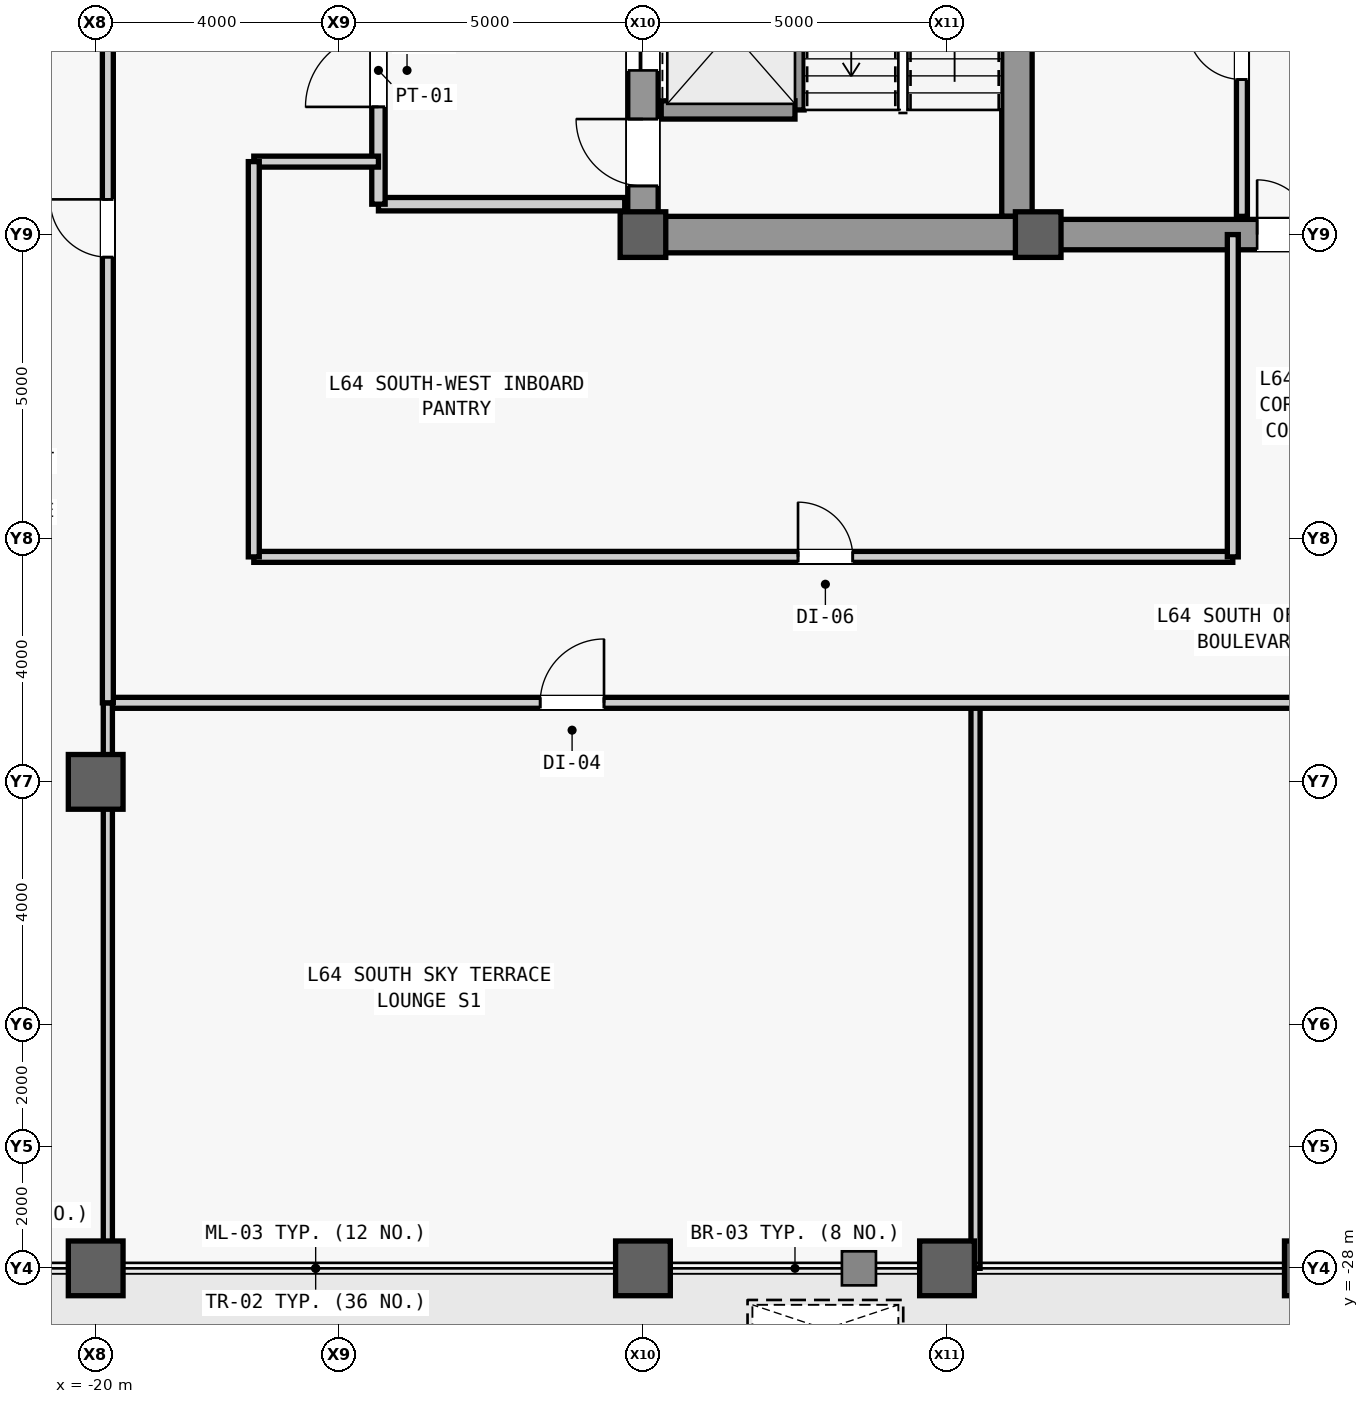
"""IFC4 building model, lengths in metres.
Left out: names, types, materials, properties, quantities, classifications, styles, units other than length and angle.
Written with IfcOpenShell. Run it as: python <this file> out.ifc"""

import sys

from ifc_helpers import new_model, si_unit, direction, frame, frame_2d, origin, origin_2d, place, context, subcontext, project, spatial, rectangle, hollow_rectangle, extrude, source, transform, mapped, element, fill, save


model = new_model("IFC4")
c1 = context("Model", 3, precision=1e-05, world=origin(), true_north=direction((0.0, 1.0)))
c2 = subcontext(c1, "Body", "Model", "MODEL_VIEW")
j1 = project(units=[si_unit("LENGTHUNIT", "METRE"), si_unit("PLANEANGLEUNIT", "RADIAN")], contexts=[c1])
p1 = place(None, origin())
s1 = spatial("IfcSite", under=j1, at=p1, CompositionType="ELEMENT")
p2 = place(p1, origin())
s2 = spatial("IfcBuilding", under=s1, at=p2, CompositionType="ELEMENT")
p3 = place(p2, frame((0.0, 0.0, 273.5)))
s3 = spatial("IfcBuildingStorey", under=s2, at=p3, CompositionType="ELEMENT", Elevation=273.5)
m1 = source(origin(), c2, "Body", "SweptSolid", [
    extrude(rectangle(XDim=22.0, YDim=0.5, at=frame_2d((11.0, 0.0))), origin(), (0.0, 0.0, 1.0), 3.78),
])
p4 = place(p3, frame((-11.0, -11.0, 0.0), z_axis=(0.0, 0.0, 1.0), x_axis=(0.0, 1.0, 0.0)))
e1 = element("IfcWall", 1, at=p4, inside=s3, PredefinedType="SHEAR", context=c2, shape_type="MappedRepresentation", body=[
    mapped(m1, transform((0.0, 0.0, 0.0), scale=1.0)),
])
m2 = source(origin(), c2, "Body", "SweptSolid", [
    extrude(rectangle(XDim=1.1, YDim=2.2, at=frame_2d((0.55, 1.1))), frame((0.0, 0.26, 0.0), z_axis=(0.0, -1.0, 0.0), x_axis=(1.0, 0.0, 0.0)), (0.0, 0.0, 1.0), 0.52),
])
p5 = place(p4, frame((0.8, 0.0, 0.0)))
e2 = element("IfcOpeningElement", 2, at=p5, cuts=e1, PredefinedType="OPENING", context=c2, shape_type="MappedRepresentation", body=[
    mapped(m2, transform((0.0, 0.0, 0.0), scale=1.0)),
])
p6 = place(p4, frame((12.5, 0.0, 0.0)))
e3 = element("IfcOpeningElement", 3, at=p6, cuts=e1, PredefinedType="OPENING", context=c2, shape_type="MappedRepresentation", body=[
    mapped(m2, transform((0.0, 0.0, 0.0), scale=1.0)),
])
m3 = source(origin(), c2, "Body", "SweptSolid", [
    extrude(rectangle(XDim=0.9, YDim=2.15, at=frame_2d((0.45, 1.075))), frame((0.0, 0.26, 0.0), z_axis=(0.0, -1.0, 0.0), x_axis=(1.0, 0.0, 0.0)), (0.0, 0.0, 1.0), 0.52),
])
p7 = place(p4, frame((6.2, 0.0, 0.0)))
e4 = element("IfcOpeningElement", 4, at=p7, cuts=e1, PredefinedType="OPENING", context=c2, shape_type="MappedRepresentation", body=[
    mapped(m3, transform((0.0, 0.0, 0.0), scale=1.0)),
])
p8 = place(p4, frame((8.05, 0.0, 0.0)))
e5 = element("IfcOpeningElement", 5, at=p8, cuts=e1, PredefinedType="OPENING", context=c2, shape_type="MappedRepresentation", body=[
    mapped(m3, transform((0.0, 0.0, 0.0), scale=1.0)),
])
m4 = source(origin(), c2, "Body", "SweptSolid", [
    extrude(rectangle(XDim=1.2, YDim=2.3, at=frame_2d((0.6, 1.15))), frame((0.0, 0.26, 0.0), z_axis=(0.0, -1.0, 0.0), x_axis=(1.0, 0.0, 0.0)), (0.0, 0.0, 1.0), 0.52),
])
p9 = place(p4, frame((14.6, 0.0, 0.0)))
e6 = element("IfcOpeningElement", 6, at=p9, cuts=e1, PredefinedType="OPENING", context=c2, shape_type="MappedRepresentation", body=[
    mapped(m4, transform((0.0, 0.0, 0.0), scale=1.0)),
])
p10 = place(p4, frame((18.2, 0.0, 0.0)))
e7 = element("IfcOpeningElement", 7, at=p10, cuts=e1, PredefinedType="OPENING", context=c2, shape_type="MappedRepresentation", body=[
    mapped(m4, transform((0.0, 0.0, 0.0), scale=1.0)),
])
m5 = source(origin(), c2, "Body", "SweptSolid", [
    extrude(rectangle(XDim=1.3, YDim=2.3, at=frame_2d((0.65, 1.15))), frame((0.0, 0.26, 0.0), z_axis=(0.0, -1.0, 0.0), x_axis=(1.0, 0.0, 0.0)), (0.0, 0.0, 1.0), 0.52),
])
p11 = place(p4, frame((2.7, 0.0, 0.0)))
e8 = element("IfcOpeningElement", 8, at=p11, cuts=e1, PredefinedType="OPENING", context=c2, shape_type="MappedRepresentation", body=[
    mapped(m5, transform((0.0, 0.0, 0.0), scale=1.0)),
])
m6 = source(origin(), c2, "Body", "SweptSolid", [
    extrude(rectangle(XDim=21.4, YDim=0.5, at=frame_2d((10.7, 0.0))), origin(), (0.0, 0.0, 1.0), 3.78),
])
p12 = place(p3, frame((-4.85, -10.7, 0.0), z_axis=(0.0, 0.0, 1.0), x_axis=(0.0, 1.0, 0.0)))
e9 = element("IfcWall", 9, at=p12, inside=s3, PredefinedType="SHEAR", context=c2, shape_type="MappedRepresentation", body=[
    mapped(m6, transform((0.0, 0.0, 0.0), scale=1.0)),
])
m7 = source(origin(), c2, "Body", "SweptSolid", [
    extrude(rectangle(XDim=5.9, YDim=0.6, at=frame_2d((2.95, 0.0))), origin(), (0.0, 0.0, 1.0), 3.78),
])
p13 = place(p3, frame((-10.75, -11.0, 0.0), z_axis=(0.0, 0.0, 1.0), x_axis=(1.0, 0.0, 0.0)))
e10 = element("IfcWall", 10, at=p13, inside=s3, PredefinedType="SHEAR", context=c2, shape_type="MappedRepresentation", body=[
    mapped(m7, transform((0.0, 0.0, 0.0), scale=1.0)),
])
m8 = source(origin(), c2, "Body", "SweptSolid", [
    extrude(rectangle(XDim=9.2, YDim=0.5, at=frame_2d((4.6, 0.0))), origin(), (0.0, 0.0, 1.0), 3.78),
])
p14 = place(p3, frame((-4.6, -11.0, 0.0), z_axis=(0.0, 0.0, 1.0), x_axis=(1.0, 0.0, 0.0)))
e11 = element("IfcWall", 11, at=p14, inside=s3, PredefinedType="SHEAR", context=c2, shape_type="MappedRepresentation", body=[
    mapped(m8, transform((0.0, 0.0, 0.0), scale=1.0)),
])
m9 = source(origin(), c2, "Body", "SweptSolid", [
    extrude(rectangle(XDim=1.8, YDim=2.25, at=frame_2d((0.9, 1.125))), frame((0.0, 0.26, 0.0), z_axis=(0.0, -1.0, 0.0), x_axis=(1.0, 0.0, 0.0)), (0.0, 0.0, 1.0), 0.52),
])
p15 = place(p14, frame((3.7, 0.0, 0.0)))
e12 = element("IfcOpeningElement", 12, at=p15, cuts=e11, PredefinedType="OPENING", context=c2, shape_type="MappedRepresentation", body=[
    mapped(m9, transform((0.0, 0.0, 0.0), scale=1.0)),
])
m10 = source(origin(), c2, "Body", "SweptSolid", [
    extrude(hollow_rectangle(XDim=0.9, YDim=0.9, WallThickness=0.05, at=origin_2d()), origin(), (0.0, 0.0, 1.0), 4.0),
])
for number, where, z_axis, x_axis in (
    (13, (-20.0, -28.0, 0.0), (0.0, 0.0, 1.0), (1.0, 0.0, 0.0)),
    (14, (-20.0, -20.0, 0.0), (0.0, 0.0, 1.0), (1.0, 0.0, 0.0)),
    (15, (-11.0, -28.0, 0.0), (0.0, 0.0, 1.0), (1.0, 0.0, 0.0)),
):
    element("IfcColumn", number, at=place(p3, frame(where, z_axis=z_axis, x_axis=x_axis)), inside=s3, PredefinedType="COLUMN", context=c2, shape_type="MappedRepresentation", body=[
        mapped(m10, transform((0.0, 0.0, 0.0), scale=1.0)),
    ])
m11 = source(origin(), c2, "Body", "SweptSolid", [
    extrude(rectangle(XDim=0.75, YDim=0.75, at=origin_2d()), origin(), (0.0, 0.0, 1.0), 4.0),
])
p16 = place(p3, frame((-11.0, -11.0, 0.0), z_axis=(0.0, 0.0, 1.0), x_axis=(1.0, 0.0, 0.0)))
e16 = element("IfcColumn", 16, at=p16, inside=s3, PredefinedType="COLUMN", context=c2, shape_type="MappedRepresentation", body=[
    mapped(m11, transform((0.0, 0.0, 0.0), scale=1.0)),
])
p17 = place(p3, frame((-6.0, -28.0, 0.0), z_axis=(0.0, 0.0, 1.0), x_axis=(1.0, 0.0, 0.0)))
e17 = element("IfcColumn", 17, at=p17, inside=s3, PredefinedType="COLUMN", context=c2, shape_type="MappedRepresentation", body=[
    mapped(m10, transform((0.0, 0.0, 0.0), scale=1.0)),
])
p18 = place(p3, frame((-4.5, -11.0, 0.0), z_axis=(0.0, 0.0, 1.0), x_axis=(1.0, 0.0, 0.0)))
e18 = element("IfcColumn", 18, at=p18, inside=s3, PredefinedType="COLUMN", context=c2, shape_type="MappedRepresentation", body=[
    mapped(m11, transform((0.0, 0.0, 0.0), scale=1.0)),
])
p19 = place(p3, frame((0.0, -28.0, 0.0), z_axis=(0.0, 0.0, 1.0), x_axis=(1.0, 0.0, 0.0)))
e19 = element("IfcColumn", 19, at=p19, inside=s3, PredefinedType="COLUMN", context=c2, shape_type="MappedRepresentation", body=[
    mapped(m10, transform((0.0, 0.0, 0.0), scale=1.0)),
])
m12 = source(origin(), c2, "Body", "SweptSolid", [
    extrude(rectangle(XDim=7.8, YDim=0.3, at=frame_2d((3.9, 0.0))), origin(), (0.0, 0.0, 1.0), 3.78),
])
p20 = place(p3, frame((-8.5, -8.95, 0.0), z_axis=(0.0, 0.0, 1.0), x_axis=(0.0, 1.0, 0.0)))
e20 = element("IfcWall", 20, at=p20, inside=s3, PredefinedType="SHEAR", context=c2, shape_type="MappedRepresentation", body=[
    mapped(m12, transform((0.0, 0.0, 0.0), scale=1.0)),
])
m13 = source(origin(), c2, "Body", "SweptSolid", [
    extrude(rectangle(XDim=2.2, YDim=0.3, at=frame_2d((1.1, 0.0))), origin(), (0.0, 0.0, 1.0), 3.78),
])
p21 = place(p3, frame((-10.7, -8.95, 0.0), z_axis=(0.0, 0.0, 1.0), x_axis=(1.0, 0.0, 0.0)))
e21 = element("IfcWall", 21, at=p21, inside=s3, PredefinedType="SHEAR", context=c2, shape_type="MappedRepresentation", body=[
    mapped(m13, transform((0.0, 0.0, 0.0), scale=1.0)),
])
m14 = source(origin(), c2, "Body", "SweptSolid", [
    extrude(rectangle(XDim=4.05, YDim=0.22, at=frame_2d((2.025, 0.0))), origin(), (0.0, 0.0, 1.0), 3.78),
])
p22 = place(p3, frame((-15.35, -10.5, 0.0), z_axis=(0.0, 0.0, 1.0), x_axis=(1.0, 0.0, 0.0)))
e22 = element("IfcWall", 22, at=p22, inside=s3, PredefinedType="PARTITIONING", context=c2, shape_type="MappedRepresentation", body=[
    mapped(m14, transform((0.0, 0.0, 0.0), scale=1.0)),
])
m15 = source(origin(), c2, "Body", "SweptSolid", [
    extrude(rectangle(XDim=4.4, YDim=0.22, at=frame_2d((2.2, 0.0))), origin(), (0.0, 0.0, 1.0), 3.78),
])
p23 = place(p3, frame((-15.35, -10.5, 0.0), z_axis=(0.0, 0.0, 1.0), x_axis=(0.0, 1.0, 0.0)))
e23 = element("IfcWall", 23, at=p23, inside=s3, PredefinedType="PARTITIONING", context=c2, shape_type="MappedRepresentation", body=[
    mapped(m15, transform((0.0, 0.0, 0.0), scale=1.0)),
])
m16 = source(origin(), c2, "Body", "SweptSolid", [
    extrude(rectangle(XDim=1.2, YDim=2.2, at=frame_2d((0.6, 1.1))), frame((0.0, 0.12, 0.0), z_axis=(0.0, -1.0, 0.0), x_axis=(1.0, 0.0, 0.0)), (0.0, 0.0, 1.0), 0.24),
])
p24 = place(p23, frame((1.6, 0.0, 0.0)))
e24 = element("IfcOpeningElement", 24, at=p24, cuts=e23, PredefinedType="OPENING", context=c2, shape_type="MappedRepresentation", body=[
    mapped(m16, transform((0.0, 0.0, 0.0), scale=1.0)),
])
m17 = source(origin(), c2, "Body", "SweptSolid", [
    extrude(rectangle(XDim=5.4, YDim=0.18, at=frame_2d((2.7, 0.0))), origin(), (0.0, 0.0, 1.0), 3.78),
])
p25 = place(p3, frame((-1.15, -10.7, 0.0), z_axis=(0.0, 0.0, 1.0), x_axis=(0.0, 1.0, 0.0)))
e25 = element("IfcWall", 25, at=p25, inside=s3, PredefinedType="PARTITIONING", context=c2, shape_type="MappedRepresentation", body=[
    mapped(m17, transform((0.0, 0.0, 0.0), scale=1.0)),
])
m18 = source(origin(), c2, "Body", "SweptSolid", [
    extrude(rectangle(XDim=0.9, YDim=2.15, at=frame_2d((0.45, 1.075))), frame((0.0, 0.1, 0.0), z_axis=(0.0, -1.0, 0.0), x_axis=(1.0, 0.0, 0.0)), (0.0, 0.0, 1.0), 0.2),
])
p26 = place(p25, frame((2.25, 0.0, 0.0)))
e26 = element("IfcOpeningElement", 26, at=p26, cuts=e25, PredefinedType="OPENING", context=c2, shape_type="MappedRepresentation", body=[
    mapped(m18, transform((0.0, 0.0, 0.0), scale=1.0)),
])
m19 = source(origin(), c2, "Body", "SweptSolid", [
    extrude(rectangle(XDim=2.05, YDim=0.18, at=frame_2d((1.025, 0.0))), origin(), (0.0, 0.0, 1.0), 3.78),
])
p27 = place(p3, frame((-17.4, -9.8, 0.0), z_axis=(0.0, 0.0, 1.0), x_axis=(1.0, 0.0, 0.0)))
e27 = element("IfcWall", 27, at=p27, inside=s3, PredefinedType="PARTITIONING", context=c2, shape_type="MappedRepresentation", body=[
    mapped(m19, transform((0.0, 0.0, 0.0), scale=1.0)),
])
m20 = source(origin(), c2, "Body", "SweptSolid", [
    extrude(rectangle(XDim=16.1, YDim=0.18, at=frame_2d((8.05, 0.0))), origin(), (0.0, 0.0, 1.0), 3.78),
])
p28 = place(p3, frame((-17.4, -16.3, 0.0), z_axis=(0.0, 0.0, 1.0), x_axis=(1.0, 0.0, 0.0)))
e28 = element("IfcWall", 28, at=p28, inside=s3, PredefinedType="PARTITIONING", context=c2, shape_type="MappedRepresentation", body=[
    mapped(m20, transform((0.0, 0.0, 0.0), scale=1.0)),
])
p29 = place(p28, frame((8.95, 0.0, 0.0)))
e29 = element("IfcOpeningElement", 29, at=p29, cuts=e28, PredefinedType="OPENING", context=c2, shape_type="MappedRepresentation", body=[
    mapped(m18, transform((0.0, 0.0, 0.0), scale=1.0)),
])
m21 = source(origin(), c2, "Body", "SweptSolid", [
    extrude(rectangle(XDim=6.5, YDim=0.18, at=frame_2d((3.25, 0.0))), origin(), (0.0, 0.0, 1.0), 3.78),
])
p30 = place(p3, frame((-17.4, -16.3, 0.0), z_axis=(0.0, 0.0, 1.0), x_axis=(0.0, 1.0, 0.0)))
e30 = element("IfcWall", 30, at=p30, inside=s3, PredefinedType="PARTITIONING", context=c2, shape_type="MappedRepresentation", body=[
    mapped(m21, transform((0.0, 0.0, 0.0), scale=1.0)),
])
m22 = source(origin(), c2, "Body", "SweptSolid", [
    extrude(rectangle(XDim=5.3, YDim=0.18, at=frame_2d((2.65, 0.0))), origin(), (0.0, 0.0, 1.0), 3.78),
])
p31 = place(p3, frame((-1.3, -16.3, 0.0), z_axis=(0.0, 0.0, 1.0), x_axis=(0.0, 1.0, 0.0)))
e31 = element("IfcWall", 31, at=p31, inside=s3, PredefinedType="PARTITIONING", context=c2, shape_type="MappedRepresentation", body=[
    mapped(m22, transform((0.0, 0.0, 0.0), scale=1.0)),
])
m23 = source(origin(), c2, "Body", "SweptSolid", [
    extrude(rectangle(XDim=9.3, YDim=0.15, at=frame_2d((4.65, 0.0))), origin(), (0.0, 0.0, 1.0), 3.78),
])
p32 = place(p3, frame((-5.531, -28.0, 0.0), z_axis=(0.0, 0.0, 1.0), x_axis=(0.0, 1.0, 0.0)))
e32 = element("IfcWall", 32, at=p32, inside=s3, PredefinedType="PARTITIONING", context=c2, shape_type="MappedRepresentation", body=[
    mapped(m23, transform((0.0, 0.0, 0.0), scale=1.0)),
])
m24 = source(origin(), c2, "Body", "SweptSolid", [
    extrude(rectangle(XDim=37.55, YDim=0.18, at=frame_2d((18.775, 0.0))), origin(), (0.0, 0.0, 1.0), 3.78),
])
p33 = place(p3, frame((-19.8, -18.7, 0.0), z_axis=(0.0, 0.0, 1.0), x_axis=(1.0, 0.0, 0.0)))
e33 = element("IfcWall", 33, at=p33, inside=s3, PredefinedType="PARTITIONING", context=c2, shape_type="MappedRepresentation", body=[
    mapped(m24, transform((0.0, 0.0, 0.0), scale=1.0)),
])
m25 = source(origin(), c2, "Body", "SweptSolid", [
    extrude(rectangle(XDim=1.05, YDim=2.2, at=frame_2d((0.525, 1.1))), frame((0.0, 0.1, 0.0), z_axis=(0.0, -1.0, 0.0), x_axis=(1.0, 0.0, 0.0)), (0.0, 0.0, 1.0), 0.2),
])
p34 = place(p33, frame((7.11, 0.0, 0.0)))
e34 = element("IfcOpeningElement", 34, at=p34, cuts=e33, PredefinedType="OPENING", context=c2, shape_type="MappedRepresentation", body=[
    mapped(m25, transform((0.0, 0.0, 0.0), scale=1.0)),
])
p35 = place(p33, frame((24.86, 0.0, 0.0)))
e35 = element("IfcOpeningElement", 35, at=p35, cuts=e33, PredefinedType="OPENING", context=c2, shape_type="MappedRepresentation", body=[
    mapped(m25, transform((0.0, 0.0, 0.0), scale=1.0)),
])
m26 = source(origin(), c2, "Body", "SweptSolid", [
    extrude(rectangle(XDim=9.3, YDim=0.15, at=frame_2d((4.65, 0.0))), origin(), (0.0, 0.0, 1.0), 3.164),
])
p36 = place(p3, frame((-19.8, -28.0, 0.0), z_axis=(0.0, 0.0, 1.0), x_axis=(0.0, 1.0, 0.0)))
e36 = element("IfcWall", 36, at=p36, inside=s3, PredefinedType="PARTITIONING", context=c2, shape_type="MappedRepresentation", body=[
    mapped(m26, transform((0.0, 0.0, 0.0), scale=1.0)),
])
m27 = source(origin(), c2, "Body", "SweptSolid", [
    extrude(rectangle(XDim=41.2, YDim=0.18, at=frame_2d((20.6, 0.0))), origin(), (0.0, 0.0, 1.0), 3.164),
])
p37 = place(p3, frame((-19.8, -18.7, 0.0), z_axis=(0.0, 0.0, 1.0), x_axis=(0.0, 1.0, 0.0)))
e37 = element("IfcWall", 37, at=p37, inside=s3, PredefinedType="PARTITIONING", context=c2, shape_type="MappedRepresentation", body=[
    mapped(m27, transform((0.0, 0.0, 0.0), scale=1.0)),
])
m28 = source(origin(), c2, "Body", "SweptSolid", [
    extrude(rectangle(XDim=0.95, YDim=2.15, at=frame_2d((0.475, 1.075))), frame((0.0, 0.1, 0.0), z_axis=(0.0, -1.0, 0.0), x_axis=(1.0, 0.0, 0.0)), (0.0, 0.0, 1.0), 0.2),
])
p38 = place(p37, frame((7.329, 0.0, 0.0)))
e38 = element("IfcOpeningElement", 38, at=p38, cuts=e37, PredefinedType="OPENING", context=c2, shape_type="MappedRepresentation", body=[
    mapped(m28, transform((0.0, 0.0, 0.0), scale=1.0)),
])
p39 = place(p37, frame((17.875, 0.0, 0.0)))
e39 = element("IfcOpeningElement", 39, at=p39, cuts=e37, PredefinedType="OPENING", context=c2, shape_type="MappedRepresentation", body=[
    mapped(m28, transform((0.0, 0.0, 0.0), scale=1.0)),
])
p40 = place(p37, frame((28.421, 0.0, 0.0)))
e40 = element("IfcOpeningElement", 40, at=p40, cuts=e37, PredefinedType="OPENING", context=c2, shape_type="MappedRepresentation", body=[
    mapped(m28, transform((0.0, 0.0, 0.0), scale=1.0)),
])
m29 = source(origin(), c2, "Body", "SweptSolid", [
    extrude(rectangle(XDim=1.1, YDim=2.2, at=frame_2d((0.55, 1.1))), frame((0.0, 0.025, 0.0), z_axis=(0.0, -1.0, 0.0), x_axis=(1.0, 0.0, 0.0)), (0.0, 0.0, 1.0), 0.05),
])
p41 = place(p5, origin())
e41 = element("IfcDoor", 41, at=p41, inside=s3, OperationType="SINGLE_SWING_RIGHT", PredefinedType="DOOR", context=c2, shape_type="MappedRepresentation", body=[
    mapped(m29, transform((0.0, 0.0, 0.0), scale=1.0)),
])
fill(e2, e41)
m30 = source(origin(), c2, "Body", "SweptSolid", [
    extrude(rectangle(XDim=1.2, YDim=2.2, at=frame_2d((0.6, 1.1))), frame((0.0, 0.025, 0.0), z_axis=(0.0, -1.0, 0.0), x_axis=(1.0, 0.0, 0.0)), (0.0, 0.0, 1.0), 0.05),
])
p42 = place(p24, origin())
e42 = element("IfcDoor", 42, at=p42, inside=s3, OperationType="SINGLE_SWING_LEFT", PredefinedType="DOOR", context=c2, shape_type="MappedRepresentation", body=[
    mapped(m30, transform((0.0, 0.0, 0.0), scale=1.0)),
])
fill(e24, e42)
m31 = source(origin(), c2, "Body", "SweptSolid", [
    extrude(rectangle(XDim=0.9, YDim=2.15, at=frame_2d((0.45, 1.075))), frame((0.0, 0.025, 0.0), z_axis=(0.0, -1.0, 0.0), x_axis=(1.0, 0.0, 0.0)), (0.0, 0.0, 1.0), 0.05),
])
p43 = place(p26, origin())
e43 = element("IfcDoor", 43, at=p43, inside=s3, OperationType="SINGLE_SWING_RIGHT", PredefinedType="DOOR", context=c2, shape_type="MappedRepresentation", body=[
    mapped(m31, transform((0.0, 0.0, 0.0), scale=1.0)),
])
fill(e26, e43)
m32 = source(origin(), c2, "Body", "SweptSolid", [
    extrude(rectangle(XDim=1.8, YDim=2.25, at=frame_2d((0.9, 1.125))), frame((0.0, 0.025, 0.0), z_axis=(0.0, -1.0, 0.0), x_axis=(1.0, 0.0, 0.0)), (0.0, 0.0, 1.0), 0.05),
])
p44 = place(p15, origin())
e44 = element("IfcDoor", 44, at=p44, inside=s3, OperationType="SINGLE_SWING_LEFT", PredefinedType="DOOR", context=c2, shape_type="MappedRepresentation", body=[
    mapped(m32, transform((0.0, 0.0, 0.0), scale=1.0)),
])
fill(e12, e44)
p45 = place(p29, origin())
e45 = element("IfcDoor", 45, at=p45, inside=s3, OperationType="SINGLE_SWING_LEFT", PredefinedType="DOOR", context=c2, shape_type="MappedRepresentation", body=[
    mapped(m31, transform((0.0, 0.0, 0.0), scale=1.0)),
])
fill(e29, e45)
m33 = source(origin(), c2, "Body", "SweptSolid", [
    extrude(rectangle(XDim=1.05, YDim=2.2, at=frame_2d((0.525, 1.1))), frame((0.0, 0.025, 0.0), z_axis=(0.0, -1.0, 0.0), x_axis=(1.0, 0.0, 0.0)), (0.0, 0.0, 1.0), 0.05),
])
p46 = place(p34, origin())
e46 = element("IfcDoor", 46, at=p46, inside=s3, OperationType="SINGLE_SWING_RIGHT", PredefinedType="DOOR", context=c2, shape_type="MappedRepresentation", body=[
    mapped(m33, transform((0.0, 0.0, 0.0), scale=1.0)),
])
fill(e34, e46)
m34 = source(origin(), c2, "Body", "SweptSolid", [
    extrude(rectangle(XDim=0.95, YDim=2.15, at=frame_2d((0.475, 1.075))), frame((0.0, 0.025, 0.0), z_axis=(0.0, -1.0, 0.0), x_axis=(1.0, 0.0, 0.0)), (0.0, 0.0, 1.0), 0.05),
])
p47 = place(p38, origin())
e47 = element("IfcDoor", 47, at=p47, inside=s3, OperationType="SINGLE_SWING_RIGHT", PredefinedType="DOOR", context=c2, shape_type="MappedRepresentation", body=[
    mapped(m34, transform((0.0, 0.0, 0.0), scale=1.0)),
])
fill(e38, e47)
m35 = source(origin(), c2, "Body", "SweptSolid", [
    extrude(rectangle(XDim=1.3, YDim=2.3, at=frame_2d((0.65, 1.15))), frame((0.0, 0.025, 0.0), z_axis=(0.0, -1.0, 0.0), x_axis=(1.0, 0.0, 0.0)), (0.0, 0.0, 1.0), 0.05),
])
p48 = place(p11, origin())
e48 = element("IfcDoor", 48, at=p48, inside=s3, OperationType="SLIDING_TO_LEFT", PredefinedType="DOOR", context=c2, shape_type="MappedRepresentation", body=[
    mapped(m35, transform((0.0, 0.0, 0.0), scale=1.0)),
])
fill(e8, e48)
save(model, sys.argv[1])
